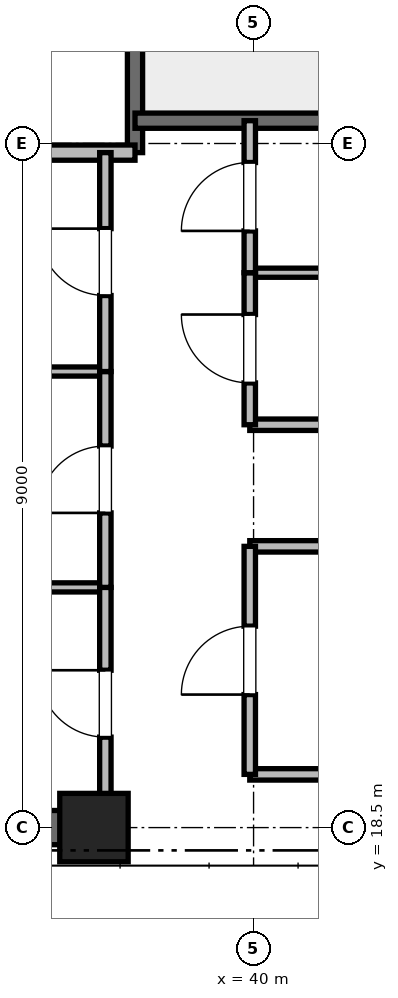
"""IFC4 building model, lengths in metres.
Left out: names, types, materials, properties, quantities, classifications, styles, units other than length and angle.
Written with IfcOpenShell. Run it as: python <this file> out.ifc"""

import sys

from ifc_helpers import new_model, si_unit, direction, frame, frame_2d, origin, origin_2d, place, context, subcontext, project, spatial, rectangle, extrude, element, fill, save


model = new_model("IFC4")
c1 = context("Model", 3, precision=1e-05, world=origin(), true_north=direction((0.0, 1.0)))
c2 = subcontext(c1, "Body", "Model", "MODEL_VIEW")
j1 = project(units=[si_unit("LENGTHUNIT", "METRE"), si_unit("PLANEANGLEUNIT", "RADIAN")], contexts=[c1])
p1 = place(None, origin())
s1 = spatial("IfcSite", under=j1, at=p1, CompositionType="ELEMENT")
p2 = place(p1, origin())
s2 = spatial("IfcBuilding", under=s1, at=p2, CompositionType="ELEMENT")
p3 = place(p2, frame((0.0, 0.0, 295.2)))
s3 = spatial("IfcBuildingStorey", under=s2, at=p3, CompositionType="ELEMENT", Elevation=295.2)
p4 = place(p3, frame((37.9, 18.5, 0.0), z_axis=(0.0, 0.0, 1.0), x_axis=(1.0, 0.0, 0.0)))
e1 = element("IfcColumn", 1, at=p4, inside=s3, PredefinedType="PILASTER", context=c2, shape_type="SweptSolid", body=[
    extrude(rectangle(XDim=0.9, YDim=0.9, at=origin_2d()), origin(), (0.0, 0.0, 1.0), 5.8),
])
p5 = place(p3, frame((29.0, 18.5, 0.0), z_axis=(0.0, 0.0, 1.0), x_axis=(1.0, 0.0, 0.0)))
e2 = element("IfcWall", 2, at=p5, inside=s3, PredefinedType="SHEAR", context=c2, shape_type="SweptSolid", body=[
    extrude(rectangle(XDim=9.2, YDim=0.45, at=frame_2d((4.6, 0.0))), origin(), (0.0, 0.0, 1.0), 5.5),
])
p6 = place(p3, frame((38.44, 27.38, 0.0), z_axis=(0.0, 0.0, 1.0), x_axis=(0.0, 1.0, 0.0)))
e3 = element("IfcWall", 3, at=p6, inside=s3, PredefinedType="SOLIDWALL", context=c2, shape_type="SweptSolid", body=[
    extrude(rectangle(XDim=8.87, YDim=0.2, at=frame_2d((4.435, 0.0))), origin(), (0.0, 0.0, 1.0), 5.5),
])
p7 = place(p3, frame((38.44, 27.8, 0.0), z_axis=(0.0, 0.0, 1.0), x_axis=(1.0, 0.0, 0.0)))
e4 = element("IfcWall", 4, at=p7, inside=s3, PredefinedType="SOLIDWALL", context=c2, shape_type="SweptSolid", body=[
    extrude(rectangle(XDim=3.32, YDim=0.2, at=frame_2d((1.66, 0.0))), origin(), (0.0, 0.0, 1.0), 5.5),
])
p8 = place(p3, frame((32.82, 27.38, 0.0), z_axis=(0.0, 0.0, 1.0), x_axis=(1.0, 0.0, 0.0)))
e5 = element("IfcWall", 5, at=p8, inside=s3, PredefinedType="PARTITIONING", context=c2, shape_type="SweptSolid", body=[
    extrude(rectangle(XDim=5.62, YDim=0.2, at=frame_2d((2.81, 0.0))), origin(), (0.0, 0.0, 1.0), 5.5),
])
for number, where, z_axis, x_axis in (
    (6, (39.95, 19.2, 0.0), (0.0, 0.0, 1.0), (1.0, 0.0, 0.0)),
    (7, (39.95, 22.2, 0.0), (0.0, 0.0, 1.0), (1.0, 0.0, 0.0)),
    (8, (39.95, 23.8, 0.0), (0.0, 0.0, 1.0), (1.0, 0.0, 0.0)),
):
    element("IfcWall", number, at=place(p3, frame(where, z_axis=z_axis, x_axis=x_axis)), inside=s3, PredefinedType="PARTITIONING", context=c2, shape_type="SweptSolid", body=[
        extrude(rectangle(XDim=1.81, YDim=0.15, at=frame_2d((0.905, 0.0))), origin(), (0.0, 0.0, 1.0), 2.85),
    ])
p9 = place(p3, frame((39.95, 25.8, 0.0), z_axis=(0.0, 0.0, 1.0), x_axis=(1.0, 0.0, 0.0)))
e9 = element("IfcWall", 9, at=p9, inside=s3, PredefinedType="PARTITIONING", context=c2, shape_type="SweptSolid", body=[
    extrude(rectangle(XDim=1.81, YDim=0.12, at=frame_2d((0.905, 0.0))), origin(), (0.0, 0.0, 1.0), 2.85),
])
p10 = place(p3, frame((39.95, 19.2, 0.0), z_axis=(0.0, 0.0, 1.0), x_axis=(0.0, 1.0, 0.0)))
e10 = element("IfcWall", 10, at=p10, inside=s3, PredefinedType="PARTITIONING", context=c2, shape_type="SweptSolid", body=[
    extrude(rectangle(XDim=3.0, YDim=0.15, at=frame_2d((1.5, 0.0))), origin(), (0.0, 0.0, 1.0), 2.85),
])
p11 = place(p10, frame((1.05, 0.0, 0.0)))
e11 = element("IfcOpeningElement", 11, at=p11, cuts=e10, PredefinedType="OPENING", context=c2, shape_type="SweptSolid", body=[
    extrude(rectangle(XDim=0.9, YDim=2.1, at=frame_2d((0.45, 1.05))), frame((0.0, 0.075, 0.0), z_axis=(0.0, -1.0, 0.0), x_axis=(1.0, 0.0, 0.0)), (0.0, 0.0, 1.0), 0.15),
])
p12 = place(p3, frame((39.95, 23.8, 0.0), z_axis=(0.0, 0.0, 1.0), x_axis=(0.0, 1.0, 0.0)))
e12 = element("IfcWall", 12, at=p12, inside=s3, PredefinedType="PARTITIONING", context=c2, shape_type="SweptSolid", body=[
    extrude(rectangle(XDim=2.0, YDim=0.15, at=frame_2d((1.0, 0.0))), origin(), (0.0, 0.0, 1.0), 2.85),
])
p13 = place(p12, frame((0.55, 0.0, 0.0)))
e13 = element("IfcOpeningElement", 13, at=p13, cuts=e12, PredefinedType="OPENING", context=c2, shape_type="SweptSolid", body=[
    extrude(rectangle(XDim=0.9, YDim=2.1, at=frame_2d((0.45, 1.05))), frame((0.0, 0.075, 0.0), z_axis=(0.0, -1.0, 0.0), x_axis=(1.0, 0.0, 0.0)), (0.0, 0.0, 1.0), 0.15),
])
p14 = place(p3, frame((39.95, 25.8, 0.0), z_axis=(0.0, 0.0, 1.0), x_axis=(0.0, 1.0, 0.0)))
e14 = element("IfcWall", 14, at=p14, inside=s3, PredefinedType="PARTITIONING", context=c2, shape_type="SweptSolid", body=[
    extrude(rectangle(XDim=2.0, YDim=0.15, at=frame_2d((1.0, 0.0))), origin(), (0.0, 0.0, 1.0), 2.85),
])
p15 = place(p14, frame((0.55, 0.0, 0.0)))
e15 = element("IfcOpeningElement", 15, at=p15, cuts=e14, PredefinedType="OPENING", context=c2, shape_type="SweptSolid", body=[
    extrude(rectangle(XDim=0.9, YDim=2.1, at=frame_2d((0.45, 1.05))), frame((0.0, 0.075, 0.0), z_axis=(0.0, -1.0, 0.0), x_axis=(1.0, 0.0, 0.0)), (0.0, 0.0, 1.0), 0.15),
])
for number, where, z_axis, x_axis in (
    (16, (32.82, 21.66, 0.0), (0.0, 0.0, 1.0), (1.0, 0.0, 0.0)),
    (17, (32.82, 24.5, 0.0), (0.0, 0.0, 1.0), (1.0, 0.0, 0.0)),
):
    element("IfcWall", number, at=place(p3, frame(where, z_axis=z_axis, x_axis=x_axis)), inside=s3, PredefinedType="PARTITIONING", context=c2, shape_type="SweptSolid", body=[
        extrude(rectangle(XDim=5.23, YDim=0.12, at=frame_2d((2.615, 0.0))), origin(), (0.0, 0.0, 1.0), 2.85),
    ])
p16 = place(p3, frame((38.05, 18.6, 0.0), z_axis=(0.0, 0.0, 1.0), x_axis=(0.0, 1.0, 0.0)))
e18 = element("IfcWall", 18, at=p16, inside=s3, PredefinedType="PARTITIONING", context=c2, shape_type="SweptSolid", body=[
    extrude(rectangle(XDim=3.06, YDim=0.15, at=frame_2d((1.53, 0.0))), origin(), (0.0, 0.0, 1.0), 2.85),
])
p17 = place(p16, frame((1.09, 0.0, 0.0)))
e19 = element("IfcOpeningElement", 19, at=p17, cuts=e18, PredefinedType="OPENING", context=c2, shape_type="SweptSolid", body=[
    extrude(rectangle(XDim=0.88, YDim=2.1, at=frame_2d((0.44, 1.05))), frame((0.0, 0.075, 0.0), z_axis=(0.0, -1.0, 0.0), x_axis=(1.0, 0.0, 0.0)), (0.0, 0.0, 1.0), 0.15),
])
p18 = place(p3, frame((38.05, 21.66, 0.0), z_axis=(0.0, 0.0, 1.0), x_axis=(0.0, 1.0, 0.0)))
e20 = element("IfcWall", 20, at=p18, inside=s3, PredefinedType="PARTITIONING", context=c2, shape_type="SweptSolid", body=[
    extrude(rectangle(XDim=2.84, YDim=0.15, at=frame_2d((1.42, 0.0))), origin(), (0.0, 0.0, 1.0), 2.85),
])
p19 = place(p18, frame((0.98, 0.0, 0.0)))
e21 = element("IfcOpeningElement", 21, at=p19, cuts=e20, PredefinedType="OPENING", context=c2, shape_type="SweptSolid", body=[
    extrude(rectangle(XDim=0.88, YDim=2.1, at=frame_2d((0.44, 1.05))), frame((0.0, 0.075, 0.0), z_axis=(0.0, -1.0, 0.0), x_axis=(1.0, 0.0, 0.0)), (0.0, 0.0, 1.0), 0.15),
])
p20 = place(p3, frame((38.05, 24.5, 0.0), z_axis=(0.0, 0.0, 1.0), x_axis=(0.0, 1.0, 0.0)))
e22 = element("IfcWall", 22, at=p20, inside=s3, PredefinedType="PARTITIONING", context=c2, shape_type="SweptSolid", body=[
    extrude(rectangle(XDim=2.88, YDim=0.15, at=frame_2d((1.44, 0.0))), origin(), (0.0, 0.0, 1.0), 2.85),
])
p21 = place(p20, frame((1.0, 0.0, 0.0)))
e23 = element("IfcOpeningElement", 23, at=p21, cuts=e22, PredefinedType="OPENING", context=c2, shape_type="SweptSolid", body=[
    extrude(rectangle(XDim=0.88, YDim=2.1, at=frame_2d((0.44, 1.05))), frame((0.0, 0.075, 0.0), z_axis=(0.0, -1.0, 0.0), x_axis=(1.0, 0.0, 0.0)), (0.0, 0.0, 1.0), 0.15),
])
p22 = place(p11, origin())
e24 = element("IfcDoor", 24, at=p22, inside=s3, OperationType="SINGLE_SWING_LEFT", PredefinedType="DOOR", context=c2, shape_type="SweptSolid", body=[
    extrude(rectangle(XDim=0.9, YDim=2.1, at=frame_2d((0.45, 1.05))), frame((0.0, 0.025, 0.0), z_axis=(0.0, -1.0, 0.0), x_axis=(1.0, 0.0, 0.0)), (0.0, 0.0, 1.0), 0.05),
])
fill(e11, e24)
p23 = place(p13, origin())
e25 = element("IfcDoor", 25, at=p23, inside=s3, OperationType="SINGLE_SWING_RIGHT", PredefinedType="DOOR", context=c2, shape_type="SweptSolid", body=[
    extrude(rectangle(XDim=0.9, YDim=2.1, at=frame_2d((0.45, 1.05))), frame((0.0, 0.025, 0.0), z_axis=(0.0, -1.0, 0.0), x_axis=(1.0, 0.0, 0.0)), (0.0, 0.0, 1.0), 0.05),
])
fill(e13, e25)
p24 = place(p15, origin())
e26 = element("IfcDoor", 26, at=p24, inside=s3, OperationType="SINGLE_SWING_LEFT", PredefinedType="DOOR", context=c2, shape_type="SweptSolid", body=[
    extrude(rectangle(XDim=0.9, YDim=2.1, at=frame_2d((0.45, 1.05))), frame((0.0, 0.025, 0.0), z_axis=(0.0, -1.0, 0.0), x_axis=(1.0, 0.0, 0.0)), (0.0, 0.0, 1.0), 0.05),
])
fill(e15, e26)
p25 = place(p17, origin())
e27 = element("IfcDoor", 27, at=p25, inside=s3, OperationType="SINGLE_SWING_RIGHT", PredefinedType="DOOR", context=c2, shape_type="SweptSolid", body=[
    extrude(rectangle(XDim=0.88, YDim=2.1, at=frame_2d((0.44, 1.05))), frame((0.0, 0.025, 0.0), z_axis=(0.0, -1.0, 0.0), x_axis=(1.0, 0.0, 0.0)), (0.0, 0.0, 1.0), 0.05),
])
fill(e19, e27)
p26 = place(p19, origin())
e28 = element("IfcDoor", 28, at=p26, inside=s3, OperationType="SINGLE_SWING_LEFT", PredefinedType="DOOR", context=c2, shape_type="SweptSolid", body=[
    extrude(rectangle(XDim=0.88, YDim=2.1, at=frame_2d((0.44, 1.05))), frame((0.0, 0.025, 0.0), z_axis=(0.0, -1.0, 0.0), x_axis=(1.0, 0.0, 0.0)), (0.0, 0.0, 1.0), 0.05),
])
fill(e21, e28)
p27 = place(p21, origin())
e29 = element("IfcDoor", 29, at=p27, inside=s3, OperationType="SINGLE_SWING_RIGHT", PredefinedType="DOOR", context=c2, shape_type="SweptSolid", body=[
    extrude(rectangle(XDim=0.88, YDim=2.1, at=frame_2d((0.44, 1.05))), frame((0.0, 0.025, 0.0), z_axis=(0.0, -1.0, 0.0), x_axis=(1.0, 0.0, 0.0)), (0.0, 0.0, 1.0), 0.05),
])
fill(e23, e29)
save(model, sys.argv[1])
